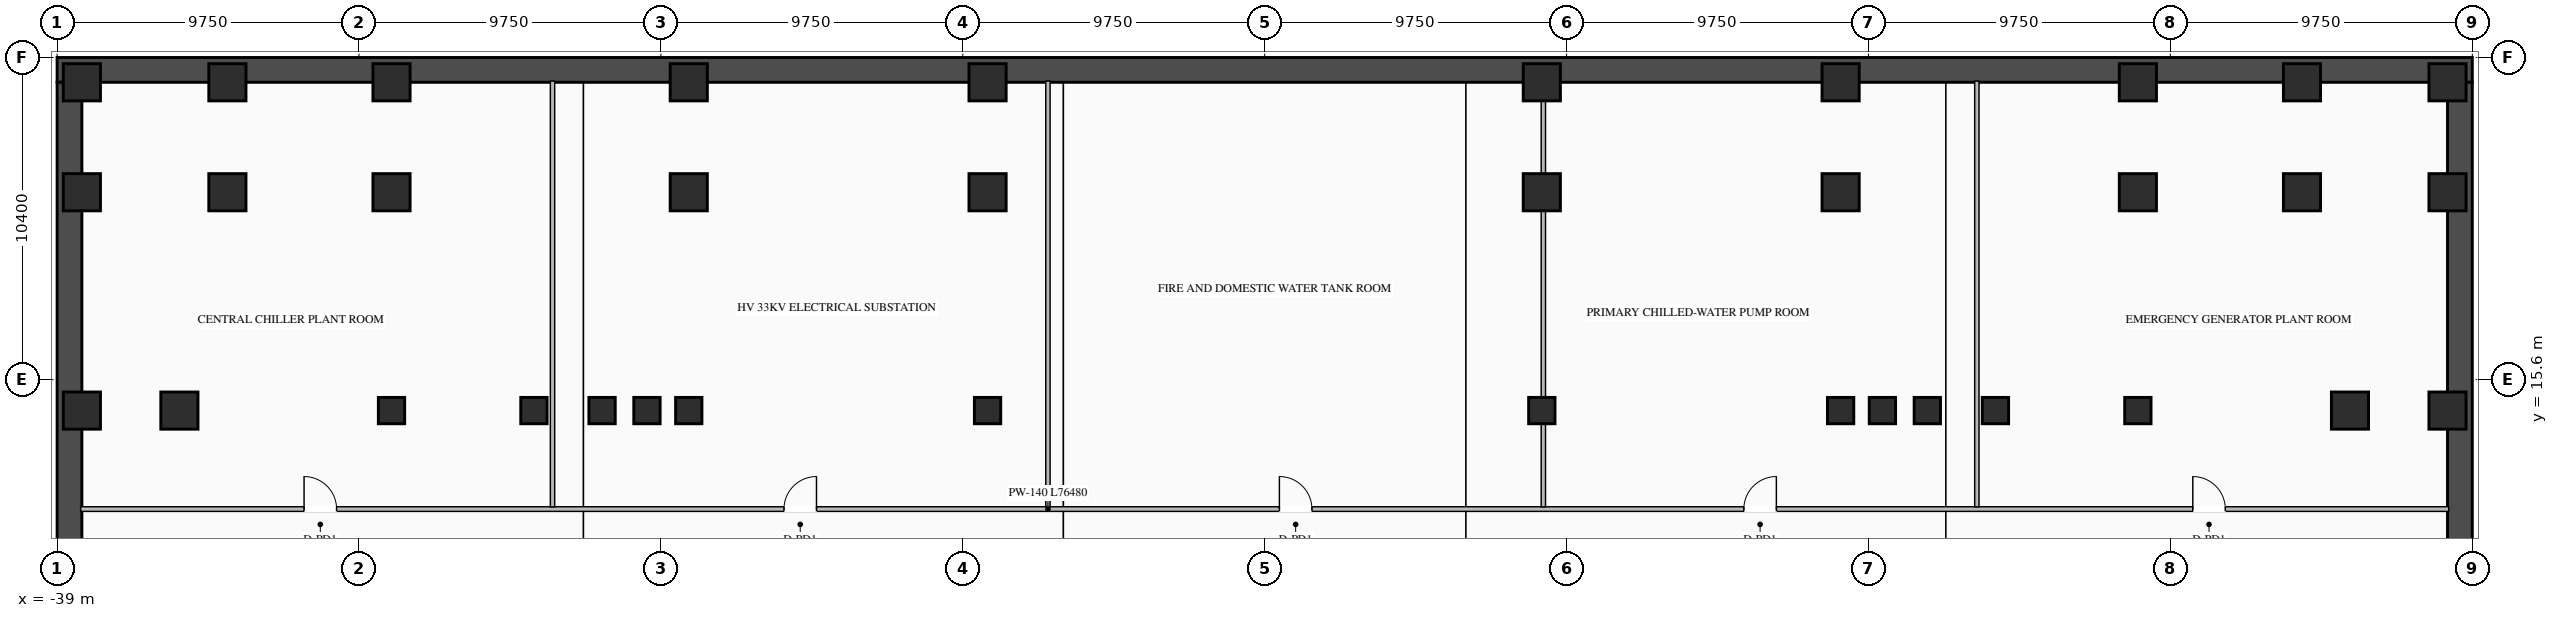
"""IFC4 building model, lengths in metres.
Left out: names, types, materials, properties, quantities, classifications, styles, units other than length and angle.
Written with IfcOpenShell. Run it as: python <this file> out.ifc"""

import sys

from ifc_helpers import new_model, si_unit, direction, frame, frame_2d, origin, origin_2d, place, context, subcontext, project, spatial, rectangle, i_section, extrude, element, fill, save


model = new_model("IFC4")
c1 = context("Model", 3, precision=1e-05, world=origin(), true_north=direction((0.0, 1.0)))
c2 = subcontext(c1, "Body", "Model", "MODEL_VIEW")
j1 = project(units=[si_unit("LENGTHUNIT", "METRE"), si_unit("PLANEANGLEUNIT", "RADIAN")], contexts=[c1])
p1 = place(None, origin())
s1 = spatial("IfcSite", under=j1, at=p1, CompositionType="ELEMENT")
p2 = place(p1, origin())
s2 = spatial("IfcBuilding", under=s1, at=p2, CompositionType="ELEMENT")
p3 = place(p2, frame((0.0, 0.0, -9.6)))
s3 = spatial("IfcBuildingStorey", under=s2, at=p3, CompositionType="ELEMENT", Elevation=-9.6)
p4 = place(p3, frame((39.0, 25.6, 0.0), z_axis=(0.0, 0.0, 1.0), x_axis=(-1.0, 0.0, 0.0)))
e1 = element("IfcWall", 1, at=p4, inside=s3, PredefinedType="SOLIDWALL", context=c2, shape_type="SweptSolid", body=[
    extrude(rectangle(XDim=78.0, YDim=0.8, at=frame_2d((39.0, 0.0))), origin(), (0.0, 0.0, 1.0), 4.5),
])
for number, where, z_axis, x_axis in (
    (2, (-38.6, -25.2, 0.0), (0.0, 0.0, 1.0), (0.0, 1.0, 0.0)),
    (3, (38.6, 25.2, 0.0), (0.0, 0.0, 1.0), (0.0, -1.0, 0.0)),
):
    element("IfcWall", number, at=place(p3, frame(where, z_axis=z_axis, x_axis=x_axis)), inside=s3, PredefinedType="SOLIDWALL", context=c2, shape_type="SweptSolid", body=[
        extrude(rectangle(XDim=50.4, YDim=0.8, at=frame_2d((25.2, 0.0))), origin(), (0.0, 0.0, 1.0), 4.5),
    ])
for number, where, z_axis, x_axis in (
    (4, (-21.4, 14.6, 0.0), (0.0, 0.0, 1.0), (1.0, 0.0, 0.0)),
    (5, (-19.95, 14.6, 0.0), (0.0, 0.0, 1.0), (1.0, 0.0, 0.0)),
    (6, (-18.6, 14.6, 0.0), (0.0, 0.0, 1.0), (1.0, 0.0, 0.0)),
    (7, (-8.95, 14.6, 0.0), (0.0, 0.0, 1.0), (1.0, 0.0, 0.0)),
    (8, (8.95, 14.6, 0.0), (0.0, 0.0, 1.0), (1.0, 0.0, 0.0)),
    (9, (18.6, 14.6, 0.0), (0.0, 0.0, 1.0), (1.0, 0.0, 0.0)),
    (10, (19.95, 14.6, 0.0), (0.0, 0.0, 1.0), (1.0, 0.0, 0.0)),
    (11, (21.4, 14.6, 0.0), (0.0, 0.0, 1.0), (1.0, 0.0, 0.0)),
    (12, (-23.6, 14.6, 0.0), (0.0, 0.0, 1.0), (1.0, 0.0, 0.0)),
    (13, (23.6, 14.6, 0.0), (0.0, 0.0, 1.0), (1.0, 0.0, 0.0)),
    (14, (-28.2, 14.6, 0.0), (0.0, 0.0, 1.0), (1.0, 0.0, 0.0)),
    (15, (28.2, 14.6, 0.0), (0.0, 0.0, 1.0), (1.0, 0.0, 0.0)),
):
    element("IfcColumn", number, at=place(p3, frame(where, z_axis=z_axis, x_axis=x_axis)), inside=s3, PredefinedType="COLUMN", context=c2, shape_type="SweptSolid", body=[
        extrude(i_section(OverallWidth=0.85, OverallDepth=0.85, WebThickness=0.032, FlangeThickness=0.048, at=origin_2d()), origin(), (0.0, 0.0, 1.0), 4.8),
    ])
for number, where, z_axis, x_axis in (
    (16, (-35.05, 14.6, 0.0), (0.0, 0.0, 1.0), (1.0, 0.0, 0.0)),
    (17, (35.05, 14.6, 0.0), (0.0, 0.0, 1.0), (1.0, 0.0, 0.0)),
    (18, (-38.2, 21.65, 0.0), (0.0, 0.0, 1.0), (1.0, 0.0, 0.0)),
    (19, (-33.5, 21.65, 0.0), (0.0, 0.0, 1.0), (1.0, 0.0, 0.0)),
    (20, (-28.2, 21.65, 0.0), (0.0, 0.0, 1.0), (1.0, 0.0, 0.0)),
    (21, (-18.6, 21.65, 0.0), (0.0, 0.0, 1.0), (1.0, 0.0, 0.0)),
    (22, (-8.95, 21.65, 0.0), (0.0, 0.0, 1.0), (1.0, 0.0, 0.0)),
    (23, (8.95, 21.65, 0.0), (0.0, 0.0, 1.0), (1.0, 0.0, 0.0)),
    (24, (18.6, 21.65, 0.0), (0.0, 0.0, 1.0), (1.0, 0.0, 0.0)),
    (25, (28.2, 21.65, 0.0), (0.0, 0.0, 1.0), (1.0, 0.0, 0.0)),
    (26, (33.5, 21.65, 0.0), (0.0, 0.0, 1.0), (1.0, 0.0, 0.0)),
    (27, (38.2, 21.65, 0.0), (0.0, 0.0, 1.0), (1.0, 0.0, 0.0)),
    (28, (-38.2, 25.2, 0.0), (0.0, 0.0, 1.0), (1.0, 0.0, 0.0)),
    (29, (-33.5, 25.2, 0.0), (0.0, 0.0, 1.0), (1.0, 0.0, 0.0)),
    (30, (-28.2, 25.2, 0.0), (0.0, 0.0, 1.0), (1.0, 0.0, 0.0)),
    (31, (-18.6, 25.2, 0.0), (0.0, 0.0, 1.0), (1.0, 0.0, 0.0)),
    (32, (-8.95, 25.2, 0.0), (0.0, 0.0, 1.0), (1.0, 0.0, 0.0)),
    (33, (8.95, 25.2, 0.0), (0.0, 0.0, 1.0), (1.0, 0.0, 0.0)),
    (34, (18.6, 25.2, 0.0), (0.0, 0.0, 1.0), (1.0, 0.0, 0.0)),
    (35, (28.2, 25.2, 0.0), (0.0, 0.0, 1.0), (1.0, 0.0, 0.0)),
    (36, (33.5, 25.2, 0.0), (0.0, 0.0, 1.0), (1.0, 0.0, 0.0)),
    (37, (38.2, 25.2, 0.0), (0.0, 0.0, 1.0), (1.0, 0.0, 0.0)),
    (38, (-38.2, 14.6, 0.0), (0.0, 0.0, 1.0), (1.0, 0.0, 0.0)),
    (39, (38.2, 14.6, 0.0), (0.0, 0.0, 1.0), (1.0, 0.0, 0.0)),
):
    element("IfcColumn", number, at=place(p3, frame(where, z_axis=z_axis, x_axis=x_axis)), inside=s3, PredefinedType="COLUMN", context=c2, shape_type="SweptSolid", body=[
        extrude(rectangle(XDim=1.2, YDim=1.2, at=origin_2d()), origin(), (0.0, 0.0, 1.0), 4.8),
    ])
p5 = place(p3, frame((-38.24, 11.42, 0.0), z_axis=(0.0, 0.0, 1.0), x_axis=(1.0, 0.0, 0.0)))
e40 = element("IfcWall", 40, at=p5, inside=s3, PredefinedType="STANDARD", context=c2, shape_type="SweptSolid", body=[
    extrude(rectangle(XDim=76.48, YDim=0.15, at=frame_2d((38.24, 0.0))), origin(), (0.0, 0.0, 1.0), 4.48),
])
p6 = place(p5, frame((7.216, 0.0, 0.0)))
e41 = element("IfcOpeningElement", 41, at=p6, cuts=e40, PredefinedType="OPENING", context=c2, shape_type="SweptSolid", body=[
    extrude(rectangle(XDim=1.05, YDim=2.08, at=frame_2d((0.525, 1.04))), frame((0.0, 0.085, 0.0), z_axis=(0.0, -1.0, 0.0), x_axis=(1.0, 0.0, 0.0)), (0.0, 0.0, 1.0), 0.17),
])
p7 = place(p5, frame((22.715, 0.0, 0.0)))
e42 = element("IfcOpeningElement", 42, at=p7, cuts=e40, PredefinedType="OPENING", context=c2, shape_type="SweptSolid", body=[
    extrude(rectangle(XDim=1.05, YDim=2.08, at=frame_2d((0.525, 1.04))), frame((0.0, 0.085, 0.0), z_axis=(0.0, -1.0, 0.0), x_axis=(1.0, 0.0, 0.0)), (0.0, 0.0, 1.0), 0.17),
])
p8 = place(p5, frame((38.715, 0.0, 0.0)))
e43 = element("IfcOpeningElement", 43, at=p8, cuts=e40, PredefinedType="OPENING", context=c2, shape_type="SweptSolid", body=[
    extrude(rectangle(XDim=1.05, YDim=2.08, at=frame_2d((0.525, 1.04))), frame((0.0, 0.085, 0.0), z_axis=(0.0, -1.0, 0.0), x_axis=(1.0, 0.0, 0.0)), (0.0, 0.0, 1.0), 0.17),
])
p9 = place(p5, frame((53.715, 0.0, 0.0)))
e44 = element("IfcOpeningElement", 44, at=p9, cuts=e40, PredefinedType="OPENING", context=c2, shape_type="SweptSolid", body=[
    extrude(rectangle(XDim=1.05, YDim=2.08, at=frame_2d((0.525, 1.04))), frame((0.0, 0.085, 0.0), z_axis=(0.0, -1.0, 0.0), x_axis=(1.0, 0.0, 0.0)), (0.0, 0.0, 1.0), 0.17),
])
p10 = place(p5, frame((68.214, 0.0, 0.0)))
e45 = element("IfcOpeningElement", 45, at=p10, cuts=e40, PredefinedType="OPENING", context=c2, shape_type="SweptSolid", body=[
    extrude(rectangle(XDim=1.05, YDim=2.08, at=frame_2d((0.525, 1.04))), frame((0.0, 0.085, 0.0), z_axis=(0.0, -1.0, 0.0), x_axis=(1.0, 0.0, 0.0)), (0.0, 0.0, 1.0), 0.17),
])
for number, where, z_axis, x_axis in (
    (46, (-23.0, 11.49, 0.0), (0.0, 0.0, 1.0), (0.0, 1.0, 0.0)),
    (47, (-7.0, 11.49, 0.0), (0.0, 0.0, 1.0), (0.0, 1.0, 0.0)),
):
    element("IfcWall", number, at=place(p3, frame(where, z_axis=z_axis, x_axis=x_axis)), inside=s3, PredefinedType="STANDARD", context=c2, shape_type="SweptSolid", body=[
        extrude(rectangle(XDim=13.75, YDim=0.14, at=frame_2d((6.875, 0.0))), origin(), (0.0, 0.0, 1.0), 4.48),
    ])
p11 = place(p3, frame((9.0, 11.49, 0.0), z_axis=(0.0, 0.0, 1.0), x_axis=(0.0, 1.0, 0.0)))
e48 = element("IfcWall", 48, at=p11, inside=s3, PredefinedType="STANDARD", context=c2, shape_type="SweptSolid", body=[
    extrude(rectangle(XDim=13.75, YDim=0.14, at=frame_2d((6.875, 0.0))), origin(), (0.0, 0.0, 1.0), 3.675),
])
p12 = place(p3, frame((23.0, 11.49, 0.0), z_axis=(0.0, 0.0, 1.0), x_axis=(0.0, 1.0, 0.0)))
e49 = element("IfcWall", 49, at=p12, inside=s3, PredefinedType="STANDARD", context=c2, shape_type="SweptSolid", body=[
    extrude(rectangle(XDim=13.75, YDim=0.14, at=frame_2d((6.875, 0.0))), origin(), (0.0, 0.0, 1.0), 4.48),
])
p13 = place(p6, origin())
e50 = element("IfcDoor", 50, at=p13, inside=s3, OperationType="SINGLE_SWING_LEFT", PredefinedType="DOOR", context=c2, shape_type="SweptSolid", body=[
    extrude(rectangle(XDim=1.05, YDim=2.08, at=frame_2d((0.525, 1.04))), frame((0.0, 0.025, 0.0), z_axis=(0.0, -1.0, 0.0), x_axis=(1.0, 0.0, 0.0)), (0.0, 0.0, 1.0), 0.05),
])
fill(e41, e50)
p14 = place(p7, origin())
e51 = element("IfcDoor", 51, at=p14, inside=s3, OperationType="SINGLE_SWING_RIGHT", PredefinedType="DOOR", context=c2, shape_type="SweptSolid", body=[
    extrude(rectangle(XDim=1.05, YDim=2.08, at=frame_2d((0.525, 1.04))), frame((0.0, 0.025, 0.0), z_axis=(0.0, -1.0, 0.0), x_axis=(1.0, 0.0, 0.0)), (0.0, 0.0, 1.0), 0.05),
])
fill(e42, e51)
p15 = place(p8, origin())
e52 = element("IfcDoor", 52, at=p15, inside=s3, OperationType="SINGLE_SWING_LEFT", PredefinedType="DOOR", context=c2, shape_type="SweptSolid", body=[
    extrude(rectangle(XDim=1.05, YDim=2.08, at=frame_2d((0.525, 1.04))), frame((0.0, 0.025, 0.0), z_axis=(0.0, -1.0, 0.0), x_axis=(1.0, 0.0, 0.0)), (0.0, 0.0, 1.0), 0.05),
])
fill(e43, e52)
p16 = place(p9, origin())
e53 = element("IfcDoor", 53, at=p16, inside=s3, OperationType="SINGLE_SWING_RIGHT", PredefinedType="DOOR", context=c2, shape_type="SweptSolid", body=[
    extrude(rectangle(XDim=1.05, YDim=2.08, at=frame_2d((0.525, 1.04))), frame((0.0, 0.025, 0.0), z_axis=(0.0, -1.0, 0.0), x_axis=(1.0, 0.0, 0.0)), (0.0, 0.0, 1.0), 0.05),
])
fill(e44, e53)
p17 = place(p10, origin())
e54 = element("IfcDoor", 54, at=p17, inside=s3, OperationType="SINGLE_SWING_LEFT", PredefinedType="DOOR", context=c2, shape_type="SweptSolid", body=[
    extrude(rectangle(XDim=1.05, YDim=2.08, at=frame_2d((0.525, 1.04))), frame((0.0, 0.025, 0.0), z_axis=(0.0, -1.0, 0.0), x_axis=(1.0, 0.0, 0.0)), (0.0, 0.0, 1.0), 0.05),
])
fill(e45, e54)
save(model, sys.argv[1])
